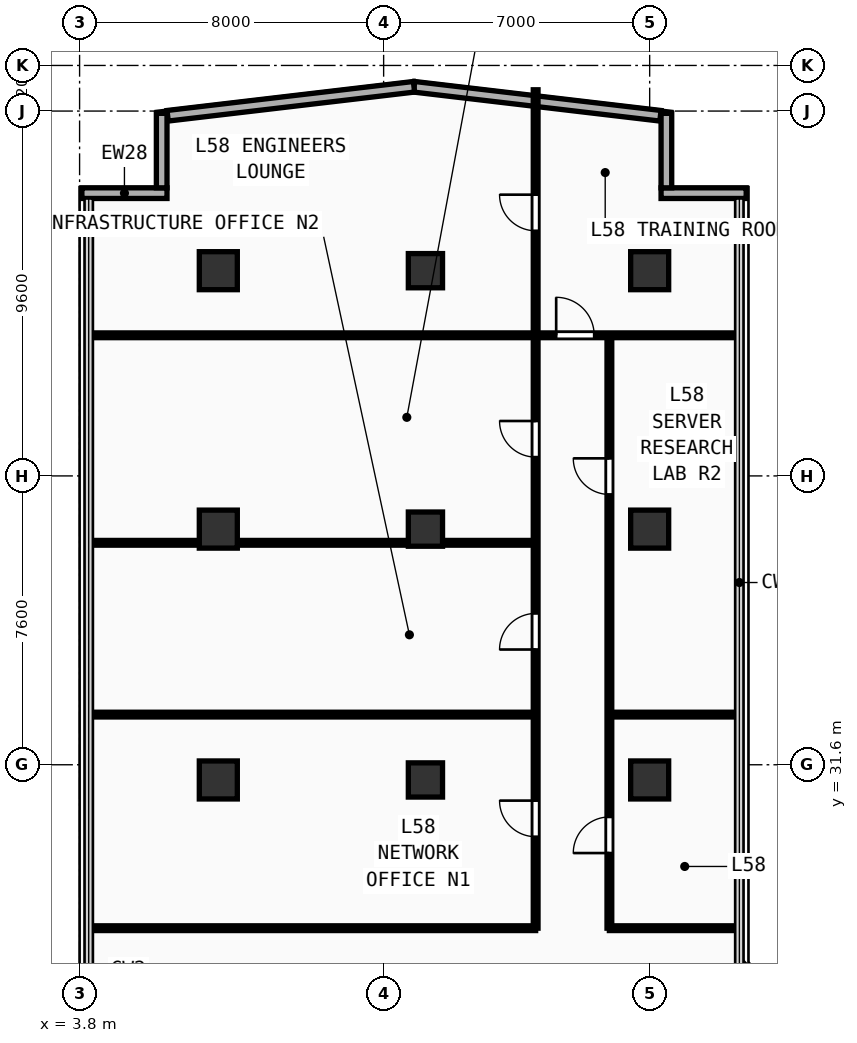
"""IFC4 building model, lengths in metres.
Left out: names, types, materials, properties, quantities, classifications, styles, units other than length and angle.
Written with IfcOpenShell. Run it as: python <this file> out.ifc"""

import sys

from ifc_helpers import new_model, si_unit, direction, frame, frame_2d, origin, origin_2d, place, context, subcontext, project, spatial, rectangle, extrude, element, fill, save


model = new_model("IFC4")
c1 = context("Model", 3, precision=1e-05, world=origin(), true_north=direction((0.0, 1.0)))
c2 = subcontext(c1, "Body", "Model", "MODEL_VIEW")
j1 = project(units=[si_unit("LENGTHUNIT", "METRE"), si_unit("PLANEANGLEUNIT", "RADIAN")], contexts=[c1])
p1 = place(None, origin())
s1 = spatial("IfcSite", under=j1, at=p1, CompositionType="ELEMENT")
p2 = place(p1, origin())
s2 = spatial("IfcBuilding", under=s1, at=p2, CompositionType="ELEMENT")
p3 = place(p2, frame((0.0, 0.0, 227.3)))
s3 = spatial("IfcBuildingStorey", under=s2, at=p3, CompositionType="ELEMENT", Elevation=227.3)
for number, where, z_axis, x_axis in (
    (1, (7.45, 31.2, 0.0), (0.0, 0.0, 1.0), (1.0, 0.0, 0.0)),
    (2, (7.45, 37.8, 0.0), (0.0, 0.0, 1.0), (1.0, 0.0, 0.0)),
    (3, (7.45, 44.6, 0.0), (0.0, 0.0, 1.0), (1.0, 0.0, 0.0)),
    (4, (18.8, 31.2, 0.0), (0.0, 0.0, 1.0), (1.0, 0.0, 0.0)),
    (5, (18.8, 37.8, 0.0), (0.0, 0.0, 1.0), (1.0, 0.0, 0.0)),
    (6, (18.8, 44.6, 0.0), (0.0, 0.0, 1.0), (1.0, 0.0, 0.0)),
):
    element("IfcColumn", number, at=place(p3, frame(where, z_axis=z_axis, x_axis=x_axis)), inside=s3, PredefinedType="COLUMN", context=c2, shape_type="SweptSolid", body=[
        extrude(rectangle(XDim=1.0, YDim=1.0, at=origin_2d()), origin(), (0.0, 0.0, 1.0), 3.56),
    ])
for number, where, z_axis, x_axis in (
    (7, (12.9, 31.2, 0.0), (0.0, 0.0, 1.0), (1.0, 0.0, 0.0)),
    (8, (12.9, 37.8, 0.0), (0.0, 0.0, 1.0), (1.0, 0.0, 0.0)),
    (9, (12.9, 44.6, 0.0), (0.0, 0.0, 1.0), (1.0, 0.0, 0.0)),
):
    element("IfcColumn", number, at=place(p3, frame(where, z_axis=z_axis, x_axis=x_axis)), inside=s3, PredefinedType="COLUMN", context=c2, shape_type="SweptSolid", body=[
        extrude(rectangle(XDim=0.9, YDim=0.9, at=origin_2d()), origin(), (0.0, 0.0, 1.0), 3.56),
    ])
p4 = place(p3, frame((19.1, 46.64, 0.0), z_axis=(0.0, 0.0, 1.0), x_axis=(1.0, 0.0, 0.0)))
e10 = element("IfcWall", 10, at=p4, inside=s3, PredefinedType="SOLIDWALL", context=c2, shape_type="SweptSolid", body=[
    extrude(rectangle(XDim=2.24, YDim=0.28, at=frame_2d((1.12, 0.0))), origin(), (0.0, 0.0, 1.0), 3.56),
])
p5 = place(p3, frame((19.24, 46.78, 0.0), z_axis=(0.0, 0.0, 1.0), x_axis=(0.0, 1.0, 0.0)))
e11 = element("IfcWall", 11, at=p5, inside=s3, PredefinedType="SOLIDWALL", context=c2, shape_type="SweptSolid", body=[
    extrude(rectangle(XDim=1.96, YDim=0.28, at=frame_2d((0.98, 0.0))), origin(), (0.0, 0.0, 1.0), 3.56),
])
p6 = place(p3, frame((3.86, 46.64, 0.0), z_axis=(0.0, 0.0, 1.0), x_axis=(1.0, 0.0, 0.0)))
e12 = element("IfcWall", 12, at=p6, inside=s3, PredefinedType="SOLIDWALL", context=c2, shape_type="SweptSolid", body=[
    extrude(rectangle(XDim=2.24, YDim=0.28, at=frame_2d((1.12, 0.0))), origin(), (0.0, 0.0, 1.0), 3.56),
])
p7 = place(p3, frame((5.96, 46.78, 0.0), z_axis=(0.0, 0.0, 1.0), x_axis=(0.0, 1.0, 0.0)))
e13 = element("IfcWall", 13, at=p7, inside=s3, PredefinedType="SOLIDWALL", context=c2, shape_type="SweptSolid", body=[
    extrude(rectangle(XDim=1.96, YDim=0.28, at=frame_2d((0.98, 0.0))), origin(), (0.0, 0.0, 1.0), 3.56),
])
p8 = place(p3, frame((27.685, 19.775, 0.0), z_axis=(0.0, 0.0, 1.0), x_axis=(-0.707106781187, 0.707106781187, 0.0)))
e14 = element("IfcWall", 14, at=p8, inside=s3, PredefinedType="SOLIDWALL", context=c2, shape_type="SweptSolid", body=[
    extrude(rectangle(XDim=9.207, YDim=0.28, at=frame_2d((4.603, 0.0))), origin(), (0.0, 0.0, 1.0), 3.56),
])
for number, where, z_axis, x_axis in (
    (15, (19.083, 48.676, 0.0), (0.0, 0.0, 1.0), (-0.993, 0.117, 0.0)),
    (16, (12.599, 49.439, 0.0), (0.0, 0.0, 1.0), (-0.993, -0.117, 0.0)),
):
    element("IfcWall", number, at=place(p3, frame(where, z_axis=z_axis, x_axis=x_axis)), inside=s3, PredefinedType="SOLIDWALL", context=c2, shape_type="SweptSolid", body=[
        extrude(rectangle(XDim=6.527, YDim=0.28, at=frame_2d((3.263, 0.0))), origin(), (0.0, 0.0, 1.0), 3.56),
    ])
p9 = place(p3, frame((4.04, 27.3, 0.0), z_axis=(0.0, 0.0, 1.0), x_axis=(1.0, 0.0, 0.0)))
e17 = element("IfcWall", 17, at=p9, inside=s3, PredefinedType="PARTITIONING", context=c2, shape_type="SweptSolid", body=[
    extrude(rectangle(XDim=11.76, YDim=0.125, at=frame_2d((5.88, 0.0))), origin(), (0.0, 0.0, 1.0), 3.56),
])
p10 = place(p3, frame((15.8, 27.3, 0.0), z_axis=(0.0, 0.0, 1.0), x_axis=(0.0, 1.0, 0.0)))
e18 = element("IfcWall", 18, at=p10, inside=s3, PredefinedType="PARTITIONING", context=c2, shape_type="SweptSolid", body=[
    extrude(rectangle(XDim=15.6, YDim=0.125, at=frame_2d((7.8, 0.0))), origin(), (0.0, 0.0, 1.0), 3.56),
])
p11 = place(p10, frame((2.407, 0.0, 0.0)))
e19 = element("IfcOpeningElement", 19, at=p11, cuts=e18, PredefinedType="OPENING", context=c2, shape_type="SweptSolid", body=[
    extrude(rectangle(XDim=0.95, YDim=2.15, at=frame_2d((0.475, 1.075))), frame((0.0, 0.073, 0.0), z_axis=(0.0, -1.0, 0.0), x_axis=(1.0, 0.0, 0.0)), (0.0, 0.0, 1.0), 0.145),
])
p12 = place(p10, frame((7.332, 0.0, 0.0)))
e20 = element("IfcOpeningElement", 20, at=p12, cuts=e18, PredefinedType="OPENING", context=c2, shape_type="SweptSolid", body=[
    extrude(rectangle(XDim=0.95, YDim=2.15, at=frame_2d((0.475, 1.075))), frame((0.0, 0.073, 0.0), z_axis=(0.0, -1.0, 0.0), x_axis=(1.0, 0.0, 0.0)), (0.0, 0.0, 1.0), 0.145),
])
p13 = place(p10, frame((12.395, 0.0, 0.0)))
e21 = element("IfcOpeningElement", 21, at=p13, cuts=e18, PredefinedType="OPENING", context=c2, shape_type="SweptSolid", body=[
    extrude(rectangle(XDim=0.95, YDim=2.15, at=frame_2d((0.475, 1.075))), frame((0.0, 0.073, 0.0), z_axis=(0.0, -1.0, 0.0), x_axis=(1.0, 0.0, 0.0)), (0.0, 0.0, 1.0), 0.145),
])
p14 = place(p3, frame((4.04, 32.92, 0.0), z_axis=(0.0, 0.0, 1.0), x_axis=(1.0, 0.0, 0.0)))
e22 = element("IfcWall", 22, at=p14, inside=s3, PredefinedType="PARTITIONING", context=c2, shape_type="SweptSolid", body=[
    extrude(rectangle(XDim=11.76, YDim=0.125, at=frame_2d((5.88, 0.0))), origin(), (0.0, 0.0, 1.0), 3.56),
])
p15 = place(p3, frame((4.04, 37.44, 0.0), z_axis=(0.0, 0.0, 1.0), x_axis=(1.0, 0.0, 0.0)))
e23 = element("IfcWall", 23, at=p15, inside=s3, PredefinedType="PARTITIONING", context=c2, shape_type="SweptSolid", body=[
    extrude(rectangle(XDim=11.76, YDim=0.125, at=frame_2d((5.88, 0.0))), origin(), (0.0, 0.0, 1.0), 3.16),
])
p16 = place(p3, frame((4.04, 42.9, 0.0), z_axis=(0.0, 0.0, 1.0), x_axis=(1.0, 0.0, 0.0)))
e24 = element("IfcWall", 24, at=p16, inside=s3, PredefinedType="PARTITIONING", context=c2, shape_type="SweptSolid", body=[
    extrude(rectangle(XDim=17.12, YDim=0.125, at=frame_2d((8.56, 0.0))), origin(), (0.0, 0.0, 1.0), 3.56),
])
p17 = place(p16, frame((12.3, 0.0, 0.0)))
e25 = element("IfcOpeningElement", 25, at=p17, cuts=e24, PredefinedType="OPENING", context=c2, shape_type="SweptSolid", body=[
    extrude(rectangle(XDim=1.0, YDim=2.2, at=frame_2d((0.5, 1.1))), frame((0.0, 0.073, 0.0), z_axis=(0.0, -1.0, 0.0), x_axis=(1.0, 0.0, 0.0)), (0.0, 0.0, 1.0), 0.145),
])
p18 = place(p3, frame((15.8, 42.9, 0.0), z_axis=(0.0, 0.0, 1.0), x_axis=(0.0, 1.0, 0.0)))
e26 = element("IfcWall", 26, at=p18, inside=s3, PredefinedType="PARTITIONING", context=c2, shape_type="SweptSolid", body=[
    extrude(rectangle(XDim=6.46, YDim=0.125, at=frame_2d((3.23, 0.0))), origin(), (0.0, 0.0, 1.0), 3.56),
])
p19 = place(p18, frame((2.75, 0.0, 0.0)))
e27 = element("IfcOpeningElement", 27, at=p19, cuts=e26, PredefinedType="OPENING", context=c2, shape_type="SweptSolid", body=[
    extrude(rectangle(XDim=0.95, YDim=2.15, at=frame_2d((0.475, 1.075))), frame((0.0, 0.073, 0.0), z_axis=(0.0, -1.0, 0.0), x_axis=(1.0, 0.0, 0.0)), (0.0, 0.0, 1.0), 0.145),
])
p20 = place(p3, frame((17.74, 27.3, 0.0), z_axis=(0.0, 0.0, 1.0), x_axis=(1.0, 0.0, 0.0)))
e28 = element("IfcWall", 28, at=p20, inside=s3, PredefinedType="PARTITIONING", context=c2, shape_type="SweptSolid", body=[
    extrude(rectangle(XDim=3.42, YDim=0.125, at=frame_2d((1.71, 0.0))), origin(), (0.0, 0.0, 1.0), 3.56),
])
p21 = place(p3, frame((17.74, 27.3, 0.0), z_axis=(0.0, 0.0, 1.0), x_axis=(0.0, 1.0, 0.0)))
e29 = element("IfcWall", 29, at=p21, inside=s3, PredefinedType="PARTITIONING", context=c2, shape_type="SweptSolid", body=[
    extrude(rectangle(XDim=15.6, YDim=0.125, at=frame_2d((7.8, 0.0))), origin(), (0.0, 0.0, 1.0), 3.56),
])
p22 = place(p21, frame((1.977, 0.0, 0.0)))
e30 = element("IfcOpeningElement", 30, at=p22, cuts=e29, PredefinedType="OPENING", context=c2, shape_type="SweptSolid", body=[
    extrude(rectangle(XDim=0.95, YDim=2.15, at=frame_2d((0.475, 1.075))), frame((0.0, 0.073, 0.0), z_axis=(0.0, -1.0, 0.0), x_axis=(1.0, 0.0, 0.0)), (0.0, 0.0, 1.0), 0.145),
])
p23 = place(p21, frame((11.412, 0.0, 0.0)))
e31 = element("IfcOpeningElement", 31, at=p23, cuts=e29, PredefinedType="OPENING", context=c2, shape_type="SweptSolid", body=[
    extrude(rectangle(XDim=0.95, YDim=2.15, at=frame_2d((0.475, 1.075))), frame((0.0, 0.073, 0.0), z_axis=(0.0, -1.0, 0.0), x_axis=(1.0, 0.0, 0.0)), (0.0, 0.0, 1.0), 0.145),
])
p24 = place(p3, frame((17.74, 32.92, 0.0), z_axis=(0.0, 0.0, 1.0), x_axis=(1.0, 0.0, 0.0)))
e32 = element("IfcWall", 32, at=p24, inside=s3, PredefinedType="PARTITIONING", context=c2, shape_type="SweptSolid", body=[
    extrude(rectangle(XDim=3.42, YDim=0.125, at=frame_2d((1.71, 0.0))), origin(), (0.0, 0.0, 1.0), 3.56),
])
p25 = place(p11, origin())
e33 = element("IfcDoor", 33, at=p25, inside=s3, OperationType="SINGLE_SWING_RIGHT", PredefinedType="DOOR", context=c2, shape_type="SweptSolid", body=[
    extrude(rectangle(XDim=0.95, YDim=2.15, at=frame_2d((0.475, 1.075))), frame((0.0, 0.025, 0.0), z_axis=(0.0, -1.0, 0.0), x_axis=(1.0, 0.0, 0.0)), (0.0, 0.0, 1.0), 0.05),
])
fill(e19, e33)
p26 = place(p12, origin())
e34 = element("IfcDoor", 34, at=p26, inside=s3, OperationType="SINGLE_SWING_LEFT", PredefinedType="DOOR", context=c2, shape_type="SweptSolid", body=[
    extrude(rectangle(XDim=0.95, YDim=2.15, at=frame_2d((0.475, 1.075))), frame((0.0, 0.025, 0.0), z_axis=(0.0, -1.0, 0.0), x_axis=(1.0, 0.0, 0.0)), (0.0, 0.0, 1.0), 0.05),
])
fill(e20, e34)
p27 = place(p13, origin())
e35 = element("IfcDoor", 35, at=p27, inside=s3, OperationType="SINGLE_SWING_RIGHT", PredefinedType="DOOR", context=c2, shape_type="SweptSolid", body=[
    extrude(rectangle(XDim=0.95, YDim=2.15, at=frame_2d((0.475, 1.075))), frame((0.0, 0.025, 0.0), z_axis=(0.0, -1.0, 0.0), x_axis=(1.0, 0.0, 0.0)), (0.0, 0.0, 1.0), 0.05),
])
fill(e21, e35)
p28 = place(p17, origin())
e36 = element("IfcDoor", 36, at=p28, inside=s3, OperationType="SINGLE_SWING_LEFT", PredefinedType="DOOR", context=c2, shape_type="SweptSolid", body=[
    extrude(rectangle(XDim=1.0, YDim=2.2, at=frame_2d((0.5, 1.1))), frame((0.0, 0.025, 0.0), z_axis=(0.0, -1.0, 0.0), x_axis=(1.0, 0.0, 0.0)), (0.0, 0.0, 1.0), 0.05),
])
fill(e25, e36)
p29 = place(p19, origin())
e37 = element("IfcDoor", 37, at=p29, inside=s3, OperationType="SINGLE_SWING_RIGHT", PredefinedType="DOOR", context=c2, shape_type="SweptSolid", body=[
    extrude(rectangle(XDim=0.95, YDim=2.15, at=frame_2d((0.475, 1.075))), frame((0.0, 0.025, 0.0), z_axis=(0.0, -1.0, 0.0), x_axis=(1.0, 0.0, 0.0)), (0.0, 0.0, 1.0), 0.05),
])
fill(e27, e37)
p30 = place(p22, origin())
e38 = element("IfcDoor", 38, at=p30, inside=s3, OperationType="SINGLE_SWING_LEFT", PredefinedType="DOOR", context=c2, shape_type="SweptSolid", body=[
    extrude(rectangle(XDim=0.95, YDim=2.15, at=frame_2d((0.475, 1.075))), frame((0.0, 0.025, 0.0), z_axis=(0.0, -1.0, 0.0), x_axis=(1.0, 0.0, 0.0)), (0.0, 0.0, 1.0), 0.05),
])
fill(e30, e38)
p31 = place(p23, origin())
e39 = element("IfcDoor", 39, at=p31, inside=s3, OperationType="SINGLE_SWING_RIGHT", PredefinedType="DOOR", context=c2, shape_type="SweptSolid", body=[
    extrude(rectangle(XDim=0.95, YDim=2.15, at=frame_2d((0.475, 1.075))), frame((0.0, 0.025, 0.0), z_axis=(0.0, -1.0, 0.0), x_axis=(1.0, 0.0, 0.0)), (0.0, 0.0, 1.0), 0.05),
])
fill(e31, e39)
save(model, sys.argv[1])
